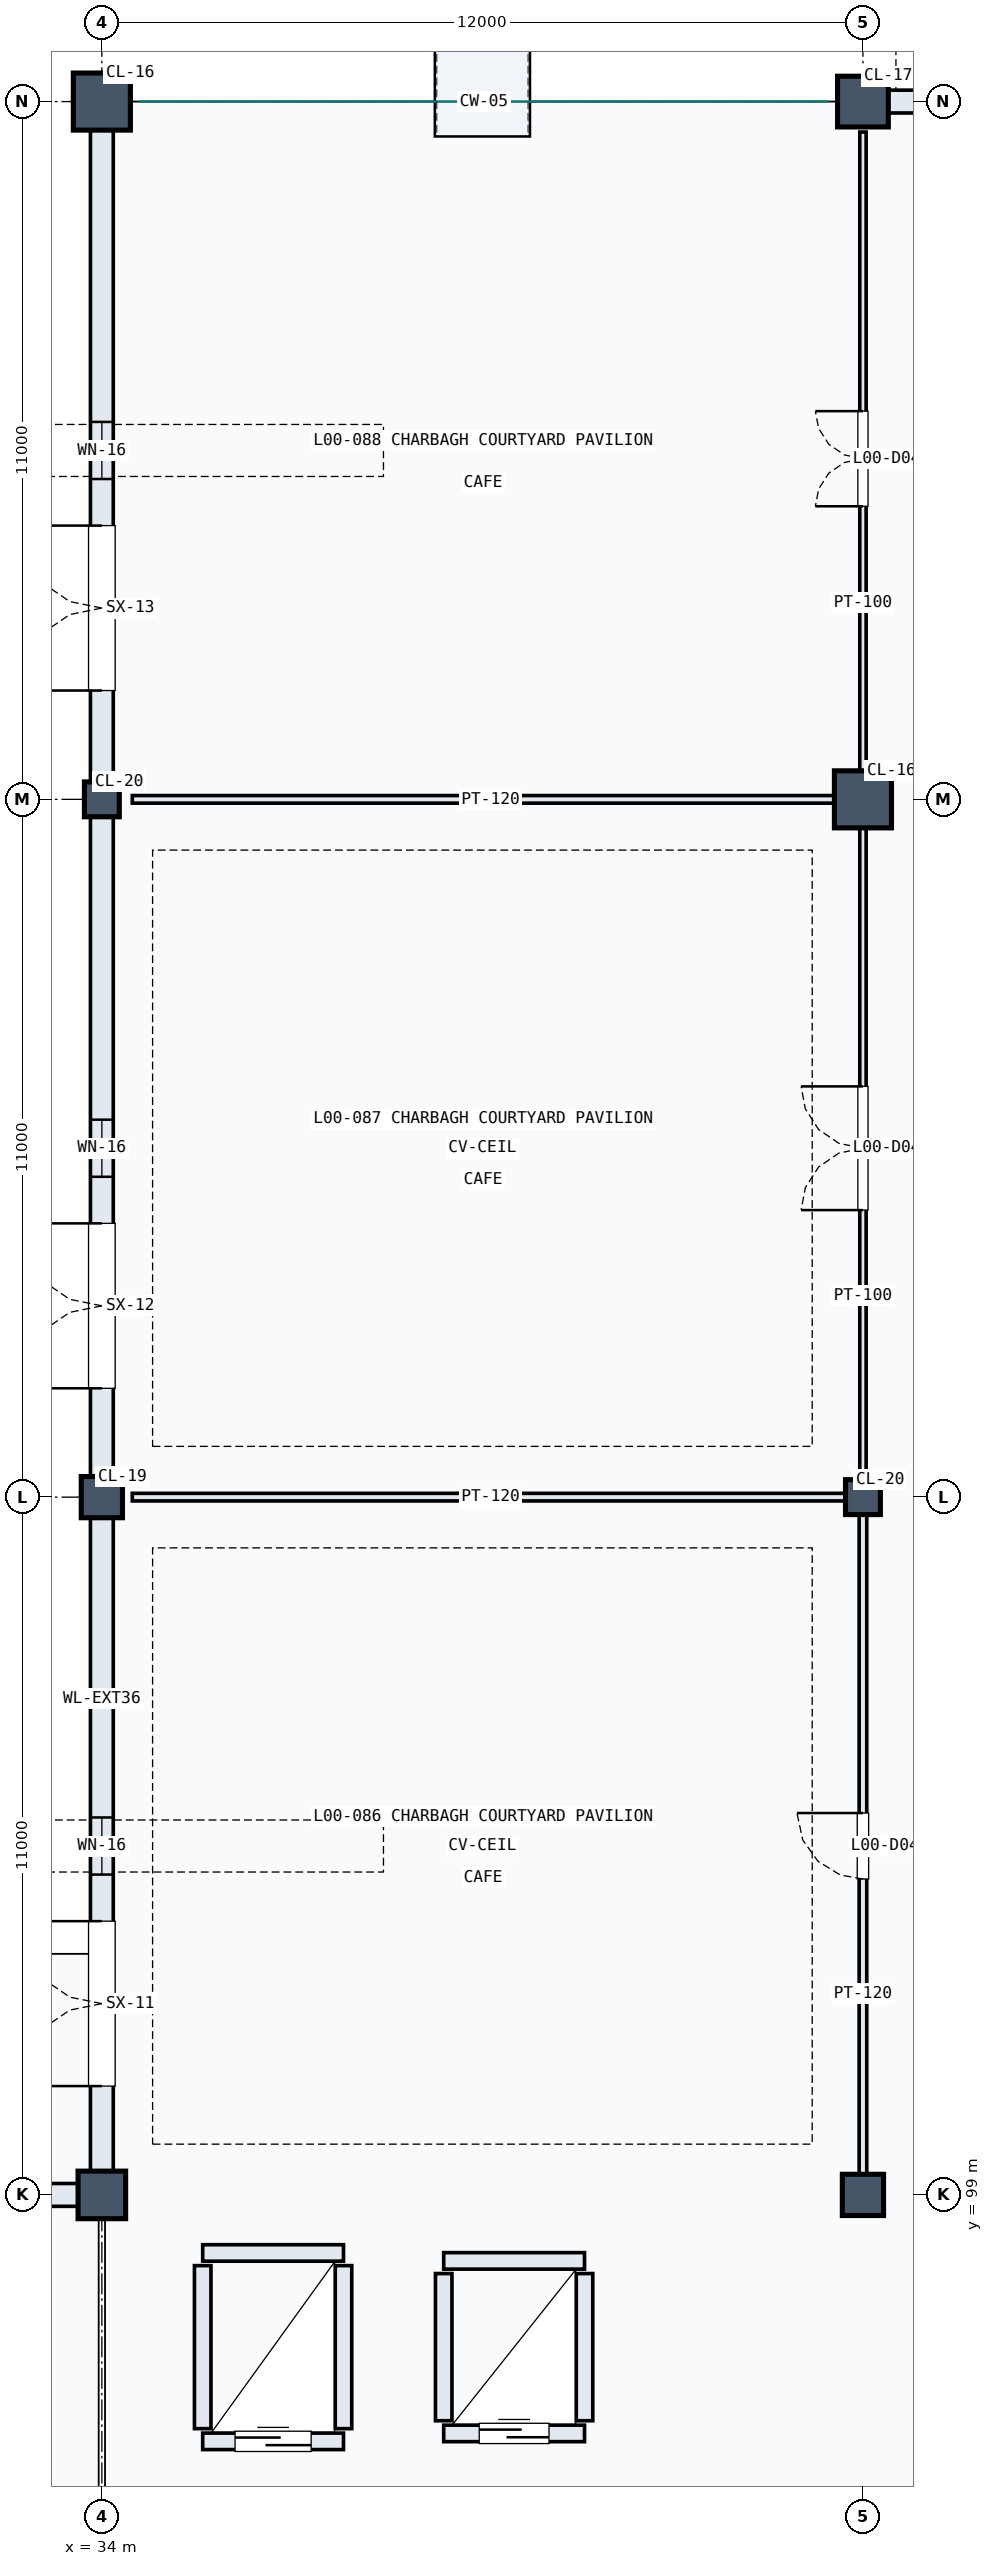
"""IFC4 building model, lengths in metres.
Left out: names, types, materials, properties, quantities, classifications, styles, units other than length and angle.
Written with IfcOpenShell. Run it as: python <this file> out.ifc"""

import sys

from ifc_helpers import new_model, si_unit, direction, frame, frame_2d, origin, origin_2d, place, context, subcontext, project, spatial, rectangle, circle, extrude, element, fill, save


model = new_model("IFC4")
c1 = context("Model", 3, precision=1e-05, world=origin(), true_north=direction((0.0, 1.0)))
c2 = subcontext(c1, "Body", "Model", "MODEL_VIEW")
j1 = project(units=[si_unit("LENGTHUNIT", "METRE"), si_unit("PLANEANGLEUNIT", "RADIAN")], contexts=[c1])
p1 = place(None, origin())
s1 = spatial("IfcSite", under=j1, at=p1, CompositionType="ELEMENT")
p2 = place(p1, origin())
s2 = spatial("IfcBuilding", under=s1, at=p2, CompositionType="ELEMENT")
p3 = place(p2, origin())
s3 = spatial("IfcBuildingStorey", under=s2, at=p3, CompositionType="ELEMENT", Elevation=0.0)
p4 = place(p3, frame((34.0, 99.0, 0.0), z_axis=(0.0, 0.0, 1.0), x_axis=(1.0, 0.0, 0.0)))
e1 = element("IfcColumn", 1, at=p4, inside=s3, PredefinedType="COLUMN", context=c2, shape_type="SweptSolid", body=[
    extrude(circle(Radius=0.375, at=origin_2d()), origin(), (0.0, 0.0, 1.0), 5.4),
])
p5 = place(p3, frame((34.0, 110.0, 0.0), z_axis=(0.0, 0.0, 1.0), x_axis=(1.0, 0.0, 0.0)))
e2 = element("IfcColumn", 2, at=p5, inside=s3, PredefinedType="COLUMN", context=c2, shape_type="SweptSolid", body=[
    extrude(circle(Radius=0.325, at=origin_2d()), origin(), (0.0, 0.0, 1.0), 5.4),
])
p6 = place(p3, frame((34.0, 121.0, 0.0), z_axis=(0.0, 0.0, 1.0), x_axis=(1.0, 0.0, 0.0)))
e3 = element("IfcColumn", 3, at=p6, inside=s3, PredefinedType="COLUMN", context=c2, shape_type="SweptSolid", body=[
    extrude(circle(Radius=0.275, at=origin_2d()), origin(), (0.0, 0.0, 1.0), 5.4),
])
p7 = place(p3, frame((34.0, 132.0, 0.0), z_axis=(0.0, 0.0, 1.0), x_axis=(1.0, 0.0, 0.0)))
e4 = element("IfcColumn", 4, at=p7, inside=s3, PredefinedType="COLUMN", context=c2, shape_type="SweptSolid", body=[
    extrude(circle(Radius=0.45, at=origin_2d()), origin(), (0.0, 0.0, 1.0), 5.4),
])
p8 = place(p3, frame((46.0, 99.0, 0.0), z_axis=(0.0, 0.0, 1.0), x_axis=(1.0, 0.0, 0.0)))
e5 = element("IfcColumn", 5, at=p8, inside=s3, PredefinedType="COLUMN", context=c2, shape_type="SweptSolid", body=[
    extrude(circle(Radius=0.325, at=origin_2d()), origin(), (0.0, 0.0, 1.0), 5.4),
])
p9 = place(p3, frame((46.0, 110.0, 0.0), z_axis=(0.0, 0.0, 1.0), x_axis=(1.0, 0.0, 0.0)))
e6 = element("IfcColumn", 6, at=p9, inside=s3, PredefinedType="COLUMN", context=c2, shape_type="SweptSolid", body=[
    extrude(circle(Radius=0.275, at=origin_2d()), origin(), (0.0, 0.0, 1.0), 5.4),
])
p10 = place(p3, frame((46.0, 121.0, 0.0), z_axis=(0.0, 0.0, 1.0), x_axis=(1.0, 0.0, 0.0)))
e7 = element("IfcColumn", 7, at=p10, inside=s3, PredefinedType="COLUMN", context=c2, shape_type="SweptSolid", body=[
    extrude(circle(Radius=0.45, at=origin_2d()), origin(), (0.0, 0.0, 1.0), 5.4),
])
p11 = place(p3, frame((46.0, 132.0, 0.0), z_axis=(0.0, 0.0, 1.0), x_axis=(1.0, 0.0, 0.0)))
e8 = element("IfcColumn", 8, at=p11, inside=s3, PredefinedType="COLUMN", context=c2, shape_type="SweptSolid", body=[
    extrude(circle(Radius=0.4, at=origin_2d()), origin(), (0.0, 0.0, 1.0), 5.4),
])
p12 = place(p3, frame((22.22, 99.0, 0.0), z_axis=(0.0, 0.0, 1.0), x_axis=(1.0, 0.0, 0.0)))
e9 = element("IfcWall", 9, at=p12, inside=s3, PredefinedType="SOLIDWALL", context=c2, shape_type="SweptSolid", body=[
    extrude(rectangle(XDim=11.56, YDim=0.36, at=frame_2d((5.78, 0.0))), origin(), (0.0, 0.0, 1.0), 4.3),
])
p13 = place(p12, frame((1.756, 0.0, 0.0)))
e10 = element("IfcOpeningElement", 10, at=p13, cuts=e9, PredefinedType="OPENING", context=c2, shape_type="SweptSolid", body=[
    extrude(rectangle(XDim=2.6, YDim=2.4, at=frame_2d((1.3, 1.2))), frame((0.0, 0.19, 0.0), z_axis=(0.0, -1.0, 0.0), x_axis=(1.0, 0.0, 0.0)), (0.0, 0.0, 1.0), 0.38),
])
p14 = place(p12, frame((7.304, 0.0, 0.0)))
e11 = element("IfcOpeningElement", 11, at=p14, cuts=e9, PredefinedType="OPENING", context=c2, shape_type="SweptSolid", body=[
    extrude(rectangle(XDim=2.6, YDim=2.4, at=frame_2d((1.3, 1.2))), frame((0.0, 0.19, 0.0), z_axis=(0.0, -1.0, 0.0), x_axis=(1.0, 0.0, 0.0)), (0.0, 0.0, 1.0), 0.38),
])
p15 = place(p3, frame((34.0, 99.22, 0.0), z_axis=(0.0, 0.0, 1.0), x_axis=(0.0, 1.0, 0.0)))
e12 = element("IfcWall", 12, at=p15, inside=s3, PredefinedType="SOLIDWALL", context=c2, shape_type="SweptSolid", body=[
    extrude(rectangle(XDim=10.56, YDim=0.36, at=frame_2d((5.28, 0.0))), origin(), (0.0, 0.0, 1.0), 4.15),
])
p16 = place(p15, frame((1.496, 0.0, 0.0)))
e13 = element("IfcOpeningElement", 13, at=p16, cuts=e12, PredefinedType="OPENING", context=c2, shape_type="SweptSolid", body=[
    extrude(rectangle(XDim=2.6, YDim=2.4, at=frame_2d((1.3, 1.2))), frame((0.0, 0.19, 0.0), z_axis=(0.0, -1.0, 0.0), x_axis=(1.0, 0.0, 0.0)), (0.0, 0.0, 1.0), 0.38),
])
p17 = place(p15, frame((4.83, 0.0, 0.8)))
e14 = element("IfcOpeningElement", 14, at=p17, cuts=e12, PredefinedType="OPENING", context=c2, shape_type="SweptSolid", body=[
    extrude(rectangle(XDim=0.9, YDim=1.8, at=frame_2d((0.45, 0.9))), frame((0.0, 0.19, 0.0), z_axis=(0.0, -1.0, 0.0), x_axis=(1.0, 0.0, 0.0)), (0.0, 0.0, 1.0), 0.38),
])
p18 = place(p3, frame((34.0, 110.22, 0.0), z_axis=(0.0, 0.0, 1.0), x_axis=(0.0, 1.0, 0.0)))
e15 = element("IfcWall", 15, at=p18, inside=s3, PredefinedType="SOLIDWALL", context=c2, shape_type="SweptSolid", body=[
    extrude(rectangle(XDim=10.56, YDim=0.36, at=frame_2d((5.28, 0.0))), origin(), (0.0, 0.0, 1.0), 4.15),
])
p19 = place(p18, frame((1.496, 0.0, 0.0)))
e16 = element("IfcOpeningElement", 16, at=p19, cuts=e15, PredefinedType="OPENING", context=c2, shape_type="SweptSolid", body=[
    extrude(rectangle(XDim=2.6, YDim=2.4, at=frame_2d((1.3, 1.2))), frame((0.0, 0.19, 0.0), z_axis=(0.0, -1.0, 0.0), x_axis=(1.0, 0.0, 0.0)), (0.0, 0.0, 1.0), 0.38),
])
p20 = place(p18, frame((4.83, 0.0, 0.8)))
e17 = element("IfcOpeningElement", 17, at=p20, cuts=e15, PredefinedType="OPENING", context=c2, shape_type="SweptSolid", body=[
    extrude(rectangle(XDim=0.9, YDim=1.8, at=frame_2d((0.45, 0.9))), frame((0.0, 0.19, 0.0), z_axis=(0.0, -1.0, 0.0), x_axis=(1.0, 0.0, 0.0)), (0.0, 0.0, 1.0), 0.38),
])
p21 = place(p3, frame((34.0, 121.22, 0.0), z_axis=(0.0, 0.0, 1.0), x_axis=(0.0, 1.0, 0.0)))
e18 = element("IfcWall", 18, at=p21, inside=s3, PredefinedType="SOLIDWALL", context=c2, shape_type="SweptSolid", body=[
    extrude(rectangle(XDim=10.56, YDim=0.36, at=frame_2d((5.28, 0.0))), origin(), (0.0, 0.0, 1.0), 4.45),
])
p22 = place(p21, frame((1.496, 0.0, 0.0)))
e19 = element("IfcOpeningElement", 19, at=p22, cuts=e18, PredefinedType="OPENING", context=c2, shape_type="SweptSolid", body=[
    extrude(rectangle(XDim=2.6, YDim=2.4, at=frame_2d((1.3, 1.2))), frame((0.0, 0.19, 0.0), z_axis=(0.0, -1.0, 0.0), x_axis=(1.0, 0.0, 0.0)), (0.0, 0.0, 1.0), 0.38),
])
p23 = place(p21, frame((4.83, 0.0, 0.8)))
e20 = element("IfcOpeningElement", 20, at=p23, cuts=e18, PredefinedType="OPENING", context=c2, shape_type="SweptSolid", body=[
    extrude(rectangle(XDim=0.9, YDim=1.8, at=frame_2d((0.45, 0.9))), frame((0.0, 0.19, 0.0), z_axis=(0.0, -1.0, 0.0), x_axis=(1.0, 0.0, 0.0)), (0.0, 0.0, 1.0), 0.38),
])
p24 = place(p3, frame((46.22, 132.0, 0.0), z_axis=(0.0, 0.0, 1.0), x_axis=(1.0, 0.0, 0.0)))
e21 = element("IfcWall", 21, at=p24, inside=s3, PredefinedType="SOLIDWALL", context=c2, shape_type="SweptSolid", body=[
    extrude(rectangle(XDim=9.18, YDim=0.36, at=frame_2d((4.59, 0.0))), origin(), (0.0, 0.0, 1.0), 5.065),
])
p25 = place(p24, frame((3.14, 0.0, 0.8)))
e22 = element("IfcOpeningElement", 22, at=p25, cuts=e21, PredefinedType="OPENING", context=c2, shape_type="SweptSolid", body=[
    extrude(rectangle(XDim=2.9, YDim=2.15, at=frame_2d((1.45, 1.075))), frame((0.0, 0.19, 0.0), z_axis=(0.0, -1.0, 0.0), x_axis=(1.0, 0.0, 0.0)), (0.0, 0.0, 1.0), 0.38),
])
p26 = place(p3, frame((35.59, 95.115, 0.0), z_axis=(0.0, 0.0, 1.0), x_axis=(1.0, 0.0, 0.0)))
e23 = element("IfcWall", 23, at=p26, inside=s3, PredefinedType="SOLIDWALL", context=c2, shape_type="SweptSolid", body=[
    extrude(rectangle(XDim=2.22, YDim=0.26, at=frame_2d((1.11, 0.0))), origin(), (0.0, 0.0, 1.0), 5.06),
])
p27 = place(p26, frame((0.51, 0.0, 0.0)))
e24 = element("IfcOpeningElement", 24, at=p27, cuts=e23, PredefinedType="OPENING", context=c2, shape_type="SweptSolid", body=[
    extrude(rectangle(XDim=1.2, YDim=2.2, at=frame_2d((0.6, 1.1))), frame((0.0, 0.14, 0.0), z_axis=(0.0, -1.0, 0.0), x_axis=(1.0, 0.0, 0.0)), (0.0, 0.0, 1.0), 0.28),
])
p28 = place(p3, frame((35.59, 98.085, 0.0), z_axis=(0.0, 0.0, 1.0), x_axis=(1.0, 0.0, 0.0)))
e25 = element("IfcWall", 25, at=p28, inside=s3, PredefinedType="SOLIDWALL", context=c2, shape_type="SweptSolid", body=[
    extrude(rectangle(XDim=2.22, YDim=0.26, at=frame_2d((1.11, 0.0))), origin(), (0.0, 0.0, 1.0), 5.06),
])
for number, where, z_axis, x_axis in (
    (26, (35.59, 95.315, 0.0), (0.0, 0.0, 1.0), (0.0, 1.0, 0.0)),
    (27, (37.81, 95.315, 0.0), (0.0, 0.0, 1.0), (0.0, 1.0, 0.0)),
):
    element("IfcWall", number, at=place(p3, frame(where, z_axis=z_axis, x_axis=x_axis)), inside=s3, PredefinedType="SOLIDWALL", context=c2, shape_type="SweptSolid", body=[
        extrude(rectangle(XDim=2.57, YDim=0.26, at=frame_2d((1.285, 0.0))), origin(), (0.0, 0.0, 1.0), 5.06),
    ])
p29 = place(p3, frame((39.39, 95.24, 0.0), z_axis=(0.0, 0.0, 1.0), x_axis=(1.0, 0.0, 0.0)))
e28 = element("IfcWall", 28, at=p29, inside=s3, PredefinedType="SOLIDWALL", context=c2, shape_type="SweptSolid", body=[
    extrude(rectangle(XDim=2.22, YDim=0.26, at=frame_2d((1.11, 0.0))), origin(), (0.0, 0.0, 1.0), 5.06),
])
p30 = place(p29, frame((0.56, 0.0, 0.0)))
e29 = element("IfcOpeningElement", 29, at=p30, cuts=e28, PredefinedType="OPENING", context=c2, shape_type="SweptSolid", body=[
    extrude(rectangle(XDim=1.1, YDim=2.15, at=frame_2d((0.55, 1.075))), frame((0.0, 0.14, 0.0), z_axis=(0.0, -1.0, 0.0), x_axis=(1.0, 0.0, 0.0)), (0.0, 0.0, 1.0), 0.28),
])
p31 = place(p3, frame((39.39, 97.96, 0.0), z_axis=(0.0, 0.0, 1.0), x_axis=(1.0, 0.0, 0.0)))
e30 = element("IfcWall", 30, at=p31, inside=s3, PredefinedType="SOLIDWALL", context=c2, shape_type="SweptSolid", body=[
    extrude(rectangle(XDim=2.22, YDim=0.26, at=frame_2d((1.11, 0.0))), origin(), (0.0, 0.0, 1.0), 5.06),
])
for number, where, z_axis, x_axis in (
    (31, (39.39, 95.44, 0.0), (0.0, 0.0, 1.0), (0.0, 1.0, 0.0)),
    (32, (41.61, 95.44, 0.0), (0.0, 0.0, 1.0), (0.0, 1.0, 0.0)),
):
    element("IfcWall", number, at=place(p3, frame(where, z_axis=z_axis, x_axis=x_axis)), inside=s3, PredefinedType="SOLIDWALL", context=c2, shape_type="SweptSolid", body=[
        extrude(rectangle(XDim=2.32, YDim=0.26, at=frame_2d((1.16, 0.0))), origin(), (0.0, 0.0, 1.0), 5.06),
    ])
p32 = place(p3, frame((46.0, 99.22, 0.0), z_axis=(0.0, 0.0, 1.0), x_axis=(0.0, 1.0, 0.0)))
e33 = element("IfcWall", 33, at=p32, inside=s3, PredefinedType="PARTITIONING", context=c2, shape_type="SweptSolid", body=[
    extrude(rectangle(XDim=10.56, YDim=0.12, at=frame_2d((5.28, 0.0))), origin(), (0.0, 0.0, 1.0), 4.1),
])
p33 = place(p32, frame((4.76, 0.0, 0.0)))
e34 = element("IfcOpeningElement", 34, at=p33, cuts=e33, PredefinedType="OPENING", context=c2, shape_type="SweptSolid", body=[
    extrude(rectangle(XDim=1.04, YDim=2.2, at=frame_2d((0.52, 1.1))), frame((0.0, 0.07, 0.0), z_axis=(0.0, -1.0, 0.0), x_axis=(1.0, 0.0, 0.0)), (0.0, 0.0, 1.0), 0.14),
])
p34 = place(p3, frame((46.0, 110.22, 0.0), z_axis=(0.0, 0.0, 1.0), x_axis=(0.0, 1.0, 0.0)))
e35 = element("IfcWall", 35, at=p34, inside=s3, PredefinedType="PARTITIONING", context=c2, shape_type="SweptSolid", body=[
    extrude(rectangle(XDim=10.56, YDim=0.1, at=frame_2d((5.28, 0.0))), origin(), (0.0, 0.0, 1.0), 4.1),
])
p35 = place(p34, frame((4.305, 0.0, 0.0)))
e36 = element("IfcOpeningElement", 36, at=p35, cuts=e35, PredefinedType="OPENING", context=c2, shape_type="SweptSolid", body=[
    extrude(rectangle(XDim=1.95, YDim=2.4, at=frame_2d((0.975, 1.2))), frame((0.0, 0.06, 0.0), z_axis=(0.0, -1.0, 0.0), x_axis=(1.0, 0.0, 0.0)), (0.0, 0.0, 1.0), 0.12),
])
p36 = place(p3, frame((46.0, 121.22, 0.0), z_axis=(0.0, 0.0, 1.0), x_axis=(0.0, 1.0, 0.0)))
e37 = element("IfcWall", 37, at=p36, inside=s3, PredefinedType="PARTITIONING", context=c2, shape_type="SweptSolid", body=[
    extrude(rectangle(XDim=10.3, YDim=0.1, at=frame_2d((5.15, 0.0))), origin(), (0.0, 0.0, 1.0), 4.55),
])
p37 = place(p36, frame((4.4, 0.0, 0.0)))
e38 = element("IfcOpeningElement", 38, at=p37, cuts=e37, PredefinedType="OPENING", context=c2, shape_type="SweptSolid", body=[
    extrude(rectangle(XDim=1.5, YDim=2.3, at=frame_2d((0.75, 1.15))), frame((0.0, 0.06, 0.0), z_axis=(0.0, -1.0, 0.0), x_axis=(1.0, 0.0, 0.0)), (0.0, 0.0, 1.0), 0.12),
])
p38 = place(p3, frame((34.48, 110.0, 0.0), z_axis=(0.0, 0.0, 1.0), x_axis=(1.0, 0.0, 0.0)))
e39 = element("IfcWall", 39, at=p38, inside=s3, PredefinedType="PARTITIONING", context=c2, shape_type="SweptSolid", body=[
    extrude(rectangle(XDim=11.3, YDim=0.12, at=frame_2d((5.65, 0.0))), origin(), (0.0, 0.0, 1.0), 4.1),
])
p39 = place(p3, frame((34.48, 121.0, 0.0), z_axis=(0.0, 0.0, 1.0), x_axis=(1.0, 0.0, 0.0)))
e40 = element("IfcWall", 40, at=p39, inside=s3, PredefinedType="PARTITIONING", context=c2, shape_type="SweptSolid", body=[
    extrude(rectangle(XDim=11.3, YDim=0.12, at=frame_2d((5.65, 0.0))), origin(), (0.0, 0.0, 1.0), 4.45),
])
p40 = place(p16, origin())
e41 = element("IfcDoor", 41, at=p40, inside=s3, OperationType="DOUBLE_DOOR_SINGLE_SWING", PredefinedType="DOOR", context=c2, shape_type="SweptSolid", body=[
    extrude(rectangle(XDim=2.6, YDim=2.4, at=frame_2d((1.3, 1.2))), frame((0.0, 0.025, 0.0), z_axis=(0.0, -1.0, 0.0), x_axis=(1.0, 0.0, 0.0)), (0.0, 0.0, 1.0), 0.05),
])
fill(e13, e41)
p41 = place(p19, origin())
e42 = element("IfcDoor", 42, at=p41, inside=s3, OperationType="DOUBLE_DOOR_SINGLE_SWING", PredefinedType="DOOR", context=c2, shape_type="SweptSolid", body=[
    extrude(rectangle(XDim=2.6, YDim=2.4, at=frame_2d((1.3, 1.2))), frame((0.0, 0.025, 0.0), z_axis=(0.0, -1.0, 0.0), x_axis=(1.0, 0.0, 0.0)), (0.0, 0.0, 1.0), 0.05),
])
fill(e16, e42)
p42 = place(p22, origin())
e43 = element("IfcDoor", 43, at=p42, inside=s3, OperationType="DOUBLE_DOOR_SINGLE_SWING", PredefinedType="DOOR", context=c2, shape_type="SweptSolid", body=[
    extrude(rectangle(XDim=2.6, YDim=2.4, at=frame_2d((1.3, 1.2))), frame((0.0, 0.025, 0.0), z_axis=(0.0, -1.0, 0.0), x_axis=(1.0, 0.0, 0.0)), (0.0, 0.0, 1.0), 0.05),
])
fill(e19, e43)
p43 = place(p17, origin())
e44 = element("IfcWindow", 44, at=p43, inside=s3, PartitioningType="SINGLE_PANEL", PredefinedType="WINDOW", context=c2, shape_type="SweptSolid", body=[
    extrude(rectangle(XDim=0.9, YDim=1.8, at=frame_2d((0.45, 0.9))), frame((0.0, 0.03, 0.0), z_axis=(0.0, -1.0, 0.0), x_axis=(1.0, 0.0, 0.0)), (0.0, 0.0, 1.0), 0.06),
])
fill(e14, e44)
p44 = place(p20, origin())
e45 = element("IfcWindow", 45, at=p44, inside=s3, PartitioningType="SINGLE_PANEL", PredefinedType="WINDOW", context=c2, shape_type="SweptSolid", body=[
    extrude(rectangle(XDim=0.9, YDim=1.8, at=frame_2d((0.45, 0.9))), frame((0.0, 0.03, 0.0), z_axis=(0.0, -1.0, 0.0), x_axis=(1.0, 0.0, 0.0)), (0.0, 0.0, 1.0), 0.06),
])
fill(e17, e45)
p45 = place(p23, origin())
e46 = element("IfcWindow", 46, at=p45, inside=s3, PartitioningType="SINGLE_PANEL", PredefinedType="WINDOW", context=c2, shape_type="SweptSolid", body=[
    extrude(rectangle(XDim=0.9, YDim=1.8, at=frame_2d((0.45, 0.9))), frame((0.0, 0.03, 0.0), z_axis=(0.0, -1.0, 0.0), x_axis=(1.0, 0.0, 0.0)), (0.0, 0.0, 1.0), 0.06),
])
fill(e20, e46)
p46 = place(p27, origin())
e47 = element("IfcDoor", 47, at=p46, inside=s3, OperationType="SLIDING_TO_LEFT", PredefinedType="DOOR", context=c2, shape_type="SweptSolid", body=[
    extrude(rectangle(XDim=1.2, YDim=2.2, at=frame_2d((0.6, 1.1))), frame((0.0, 0.025, 0.0), z_axis=(0.0, -1.0, 0.0), x_axis=(1.0, 0.0, 0.0)), (0.0, 0.0, 1.0), 0.05),
])
fill(e24, e47)
p47 = place(p30, origin())
e48 = element("IfcDoor", 48, at=p47, inside=s3, OperationType="SLIDING_TO_LEFT", PredefinedType="DOOR", context=c2, shape_type="SweptSolid", body=[
    extrude(rectangle(XDim=1.1, YDim=2.15, at=frame_2d((0.55, 1.075))), frame((0.0, 0.025, 0.0), z_axis=(0.0, -1.0, 0.0), x_axis=(1.0, 0.0, 0.0)), (0.0, 0.0, 1.0), 0.05),
])
fill(e29, e48)
p48 = place(p33, origin())
e49 = element("IfcDoor", 49, at=p48, inside=s3, OperationType="SINGLE_SWING_RIGHT", PredefinedType="DOOR", context=c2, shape_type="SweptSolid", body=[
    extrude(rectangle(XDim=1.04, YDim=2.2, at=frame_2d((0.52, 1.1))), frame((0.0, 0.025, 0.0), z_axis=(0.0, -1.0, 0.0), x_axis=(1.0, 0.0, 0.0)), (0.0, 0.0, 1.0), 0.05),
])
fill(e34, e49)
p49 = place(p35, origin())
e50 = element("IfcDoor", 50, at=p49, inside=s3, OperationType="DOUBLE_DOOR_SINGLE_SWING", PredefinedType="DOOR", context=c2, shape_type="SweptSolid", body=[
    extrude(rectangle(XDim=1.95, YDim=2.4, at=frame_2d((0.975, 1.2))), frame((0.0, 0.025, 0.0), z_axis=(0.0, -1.0, 0.0), x_axis=(1.0, 0.0, 0.0)), (0.0, 0.0, 1.0), 0.05),
])
fill(e36, e50)
p50 = place(p37, origin())
e51 = element("IfcDoor", 51, at=p50, inside=s3, OperationType="DOUBLE_DOOR_SINGLE_SWING", PredefinedType="DOOR", context=c2, shape_type="SweptSolid", body=[
    extrude(rectangle(XDim=1.5, YDim=2.3, at=frame_2d((0.75, 1.15))), frame((0.0, 0.025, 0.0), z_axis=(0.0, -1.0, 0.0), x_axis=(1.0, 0.0, 0.0)), (0.0, 0.0, 1.0), 0.05),
])
fill(e38, e51)
save(model, sys.argv[1])
